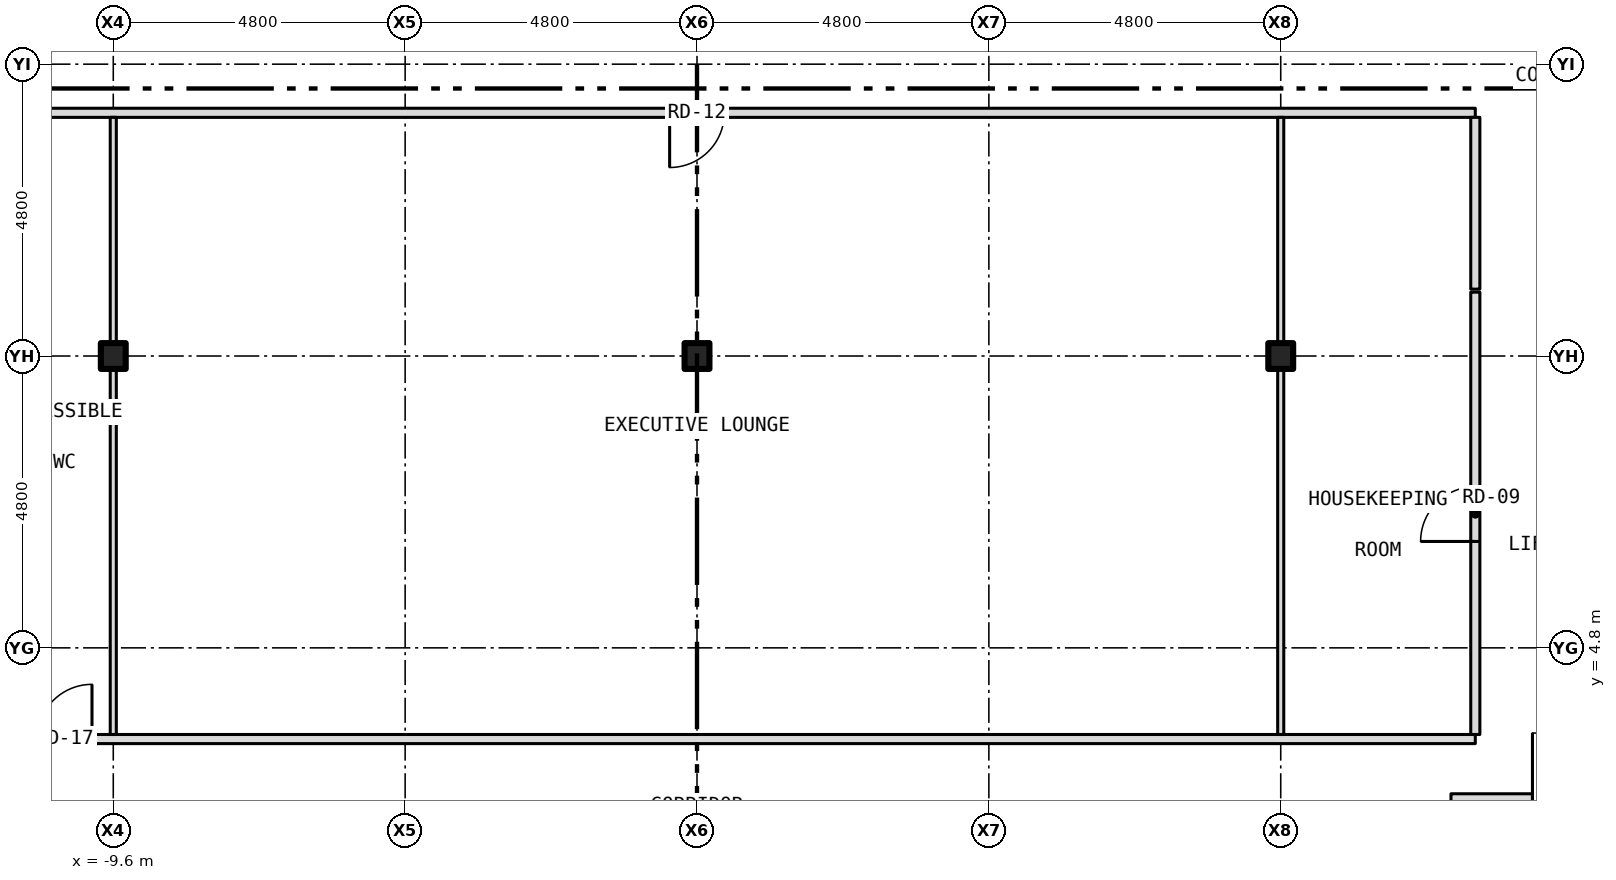
"""IFC4 building model, lengths in metres.
Left out: names, types, materials, properties, quantities, classifications, styles, units other than length and angle.
Written with IfcOpenShell. Run it as: python <this file> out.ifc"""

import sys

from ifc_helpers import new_model, si_unit, direction, frame, frame_2d, origin, origin_2d, place, context, subcontext, project, spatial, rectangle, i_section, extrude, element, fill, save


model = new_model("IFC4")
c1 = context("Model", 3, precision=1e-05, world=origin(), true_north=direction((0.0, 1.0)))
c2 = subcontext(c1, "Body", "Model", "MODEL_VIEW")
j1 = project(units=[si_unit("LENGTHUNIT", "METRE"), si_unit("PLANEANGLEUNIT", "RADIAN")], contexts=[c1])
p1 = place(None, origin())
s1 = spatial("IfcSite", under=j1, at=p1, CompositionType="ELEMENT")
p2 = place(p1, origin())
s2 = spatial("IfcBuilding", under=s1, at=p2, CompositionType="ELEMENT")
p3 = place(p2, frame((0.0, 0.0, 46.0)))
s3 = spatial("IfcBuildingStorey", under=s2, at=p3, CompositionType="ELEMENT", Elevation=46.0)
for number, where, z_axis, x_axis in (
    (1, (-9.6, 9.6, -0.15), (0.0, 0.0, 1.0), (1.0, 0.0, 0.0)),
    (2, (0.0, 9.6, -0.15), (0.0, 0.0, 1.0), (1.0, 0.0, 0.0)),
    (3, (9.6, 9.6, -0.15), (0.0, 0.0, 1.0), (1.0, 0.0, 0.0)),
):
    element("IfcColumn", number, at=place(p3, frame(where, z_axis=z_axis, x_axis=x_axis)), inside=s3, PredefinedType="COLUMN", context=c2, shape_type="SweptSolid", body=[
        extrude(i_section(OverallWidth=0.409, OverallDepth=0.424, WebThickness=0.033, FlangeThickness=0.052, at=origin_2d()), origin(), (0.0, 0.0, 1.0), 3.5),
    ])
p4 = place(p3, frame((12.4, 2.3, 0.0), z_axis=(0.0, 0.0, 1.0), x_axis=(1.0, 0.0, 0.0)))
e4 = element("IfcWall", 4, at=p4, inside=s3, PredefinedType="PARTITIONING", context=c2, shape_type="SweptSolid", body=[
    extrude(rectangle(XDim=3.28, YDim=0.2, at=frame_2d((1.64, 0.0))), origin(), (0.0, 0.0, 1.0), 3.35),
])
p5 = place(p4, frame((1.34, 0.0, 0.0)))
e5 = element("IfcOpeningElement", 5, at=p5, cuts=e4, PredefinedType="OPENING", context=c2, shape_type="SweptSolid", body=[
    extrude(rectangle(XDim=1.1, YDim=2.1, at=frame_2d((0.55, 1.05))), frame((0.0, 0.112, 0.0), z_axis=(0.0, -1.0, 0.0), x_axis=(1.0, 0.0, 0.0)), (0.0, 0.0, 1.0), 0.224),
])
p6 = place(p3, frame((-12.8, 3.3, 0.0), z_axis=(0.0, 0.0, 1.0), x_axis=(1.0, 0.0, 0.0)))
e6 = element("IfcWall", 6, at=p6, inside=s3, PredefinedType="PARTITIONING", context=c2, shape_type="SweptSolid", body=[
    extrude(rectangle(XDim=25.6, YDim=0.15, at=frame_2d((12.8, 0.0))), origin(), (0.0, 0.0, 1.0), 3.35),
])
p7 = place(p6, frame((1.95, 0.0, 0.0)))
e7 = element("IfcOpeningElement", 7, at=p7, cuts=e6, PredefinedType="OPENING", context=c2, shape_type="SweptSolid", body=[
    extrude(rectangle(XDim=0.9, YDim=2.1, at=frame_2d((0.45, 1.05))), frame((0.0, 0.087, 0.0), z_axis=(0.0, -1.0, 0.0), x_axis=(1.0, 0.0, 0.0)), (0.0, 0.0, 1.0), 0.174),
])
p8 = place(p3, frame((-12.8, 13.6, 0.0), z_axis=(0.0, 0.0, 1.0), x_axis=(1.0, 0.0, 0.0)))
e8 = element("IfcWall", 8, at=p8, inside=s3, PredefinedType="PARTITIONING", context=c2, shape_type="SweptSolid", body=[
    extrude(rectangle(XDim=25.6, YDim=0.15, at=frame_2d((12.8, 0.0))), origin(), (0.0, 0.0, 1.0), 3.35),
])
p9 = place(p8, frame((12.35, 0.0, 0.0)))
e9 = element("IfcOpeningElement", 9, at=p9, cuts=e8, PredefinedType="OPENING", context=c2, shape_type="SweptSolid", body=[
    extrude(rectangle(XDim=0.9, YDim=2.1, at=frame_2d((0.45, 1.05))), frame((0.0, 0.087, 0.0), z_axis=(0.0, -1.0, 0.0), x_axis=(1.0, 0.0, 0.0)), (0.0, 0.0, 1.0), 0.174),
])
p10 = place(p3, frame((-9.6, 3.375, 0.0), z_axis=(0.0, 0.0, 1.0), x_axis=(0.0, 1.0, 0.0)))
e10 = element("IfcWall", 10, at=p10, inside=s3, PredefinedType="PARTITIONING", context=c2, shape_type="SweptSolid", body=[
    extrude(rectangle(XDim=6.021, YDim=0.1, at=frame_2d((3.01, 0.0))), origin(), (0.0, 0.0, 1.0), 2.728),
])
p11 = place(p3, frame((-9.6, 9.396, 0.0), z_axis=(0.0, 0.0, 1.0), x_axis=(0.0, 1.0, 0.0)))
e11 = element("IfcWall", 11, at=p11, inside=s3, PredefinedType="PARTITIONING", context=c2, shape_type="SweptSolid", body=[
    extrude(rectangle(XDim=0.408, YDim=0.1, at=frame_2d((0.204, 0.0))), origin(), (0.0, 0.0, 1.0), 3.35),
])
p12 = place(p3, frame((-9.6, 9.804, 0.0), z_axis=(0.0, 0.0, 1.0), x_axis=(0.0, 1.0, 0.0)))
e12 = element("IfcWall", 12, at=p12, inside=s3, PredefinedType="PARTITIONING", context=c2, shape_type="SweptSolid", body=[
    extrude(rectangle(XDim=3.721, YDim=0.1, at=frame_2d((1.86, 0.0))), origin(), (0.0, 0.0, 1.0), 2.728),
])
p13 = place(p3, frame((9.6, 3.375, 0.0), z_axis=(0.0, 0.0, 1.0), x_axis=(0.0, 1.0, 0.0)))
e13 = element("IfcWall", 13, at=p13, inside=s3, PredefinedType="PARTITIONING", context=c2, shape_type="SweptSolid", body=[
    extrude(rectangle(XDim=6.021, YDim=0.1, at=frame_2d((3.01, 0.0))), origin(), (0.0, 0.0, 1.0), 2.728),
])
p14 = place(p3, frame((9.6, 9.396, 0.0), z_axis=(0.0, 0.0, 1.0), x_axis=(0.0, 1.0, 0.0)))
e14 = element("IfcWall", 14, at=p14, inside=s3, PredefinedType="PARTITIONING", context=c2, shape_type="SweptSolid", body=[
    extrude(rectangle(XDim=0.408, YDim=0.1, at=frame_2d((0.204, 0.0))), origin(), (0.0, 0.0, 1.0), 3.35),
])
p15 = place(p3, frame((9.6, 9.804, 0.0), z_axis=(0.0, 0.0, 1.0), x_axis=(0.0, 1.0, 0.0)))
e15 = element("IfcWall", 15, at=p15, inside=s3, PredefinedType="PARTITIONING", context=c2, shape_type="SweptSolid", body=[
    extrude(rectangle(XDim=3.721, YDim=0.1, at=frame_2d((1.86, 0.0))), origin(), (0.0, 0.0, 1.0), 2.728),
])
p16 = place(p3, frame((12.8, 3.375, 0.0), z_axis=(0.0, 0.0, 1.0), x_axis=(0.0, 1.0, 0.0)))
e16 = element("IfcWall", 16, at=p16, inside=s3, PredefinedType="PARTITIONING", context=c2, shape_type="SweptSolid", body=[
    extrude(rectangle(XDim=7.275, YDim=0.15, at=frame_2d((3.637, 0.0))), origin(), (0.0, 0.0, 1.0), 3.35),
])
p17 = place(p16, frame((3.175, 0.0, 0.0)))
e17 = element("IfcOpeningElement", 17, at=p17, cuts=e16, PredefinedType="OPENING", context=c2, shape_type="SweptSolid", body=[
    extrude(rectangle(XDim=0.9, YDim=2.1, at=frame_2d((0.45, 1.05))), frame((0.0, 0.087, 0.0), z_axis=(0.0, -1.0, 0.0), x_axis=(1.0, 0.0, 0.0)), (0.0, 0.0, 1.0), 0.174),
])
p18 = place(p3, frame((12.8, 10.7, 0.0), z_axis=(0.0, 0.0, 1.0), x_axis=(0.0, 1.0, 0.0)))
e18 = element("IfcWall", 18, at=p18, inside=s3, PredefinedType="PARTITIONING", context=c2, shape_type="SweptSolid", body=[
    extrude(rectangle(XDim=2.825, YDim=0.15, at=frame_2d((1.413, 0.0))), origin(), (0.0, 0.0, 1.0), 3.35),
])
p19 = place(p5, origin())
e19 = element("IfcDoor", 19, at=p19, inside=s3, OperationType="SINGLE_SWING_LEFT", PredefinedType="DOOR", context=c2, shape_type="SweptSolid", body=[
    extrude(rectangle(XDim=1.1, YDim=2.1, at=frame_2d((0.55, 1.05))), frame((0.0, 0.025, 0.0), z_axis=(0.0, -1.0, 0.0), x_axis=(1.0, 0.0, 0.0)), (0.0, 0.0, 1.0), 0.05),
])
fill(e5, e19)
p20 = place(p7, origin())
e20 = element("IfcDoor", 20, at=p20, inside=s3, OperationType="SINGLE_SWING_RIGHT", PredefinedType="DOOR", context=c2, shape_type="SweptSolid", body=[
    extrude(rectangle(XDim=0.9, YDim=2.1, at=frame_2d((0.45, 1.05))), frame((0.0, 0.025, 0.0), z_axis=(0.0, -1.0, 0.0), x_axis=(1.0, 0.0, 0.0)), (0.0, 0.0, 1.0), 0.05),
])
fill(e7, e20)
p21 = place(p17, origin())
e21 = element("IfcDoor", 21, at=p21, inside=s3, OperationType="SINGLE_SWING_LEFT", PredefinedType="DOOR", context=c2, shape_type="SweptSolid", body=[
    extrude(rectangle(XDim=0.9, YDim=2.1, at=frame_2d((0.45, 1.05))), frame((0.0, 0.025, 0.0), z_axis=(0.0, -1.0, 0.0), x_axis=(1.0, 0.0, 0.0)), (0.0, 0.0, 1.0), 0.05),
])
fill(e17, e21)
p22 = place(p9, origin())
e22 = element("IfcDoor", 22, at=p22, inside=s3, OperationType="SINGLE_SWING_LEFT", PredefinedType="DOOR", context=c2, shape_type="SweptSolid", body=[
    extrude(rectangle(XDim=0.9, YDim=2.1, at=frame_2d((0.45, 1.05))), frame((0.0, 0.025, 0.0), z_axis=(0.0, -1.0, 0.0), x_axis=(1.0, 0.0, 0.0)), (0.0, 0.0, 1.0), 0.05),
])
fill(e9, e22)
save(model, sys.argv[1])
